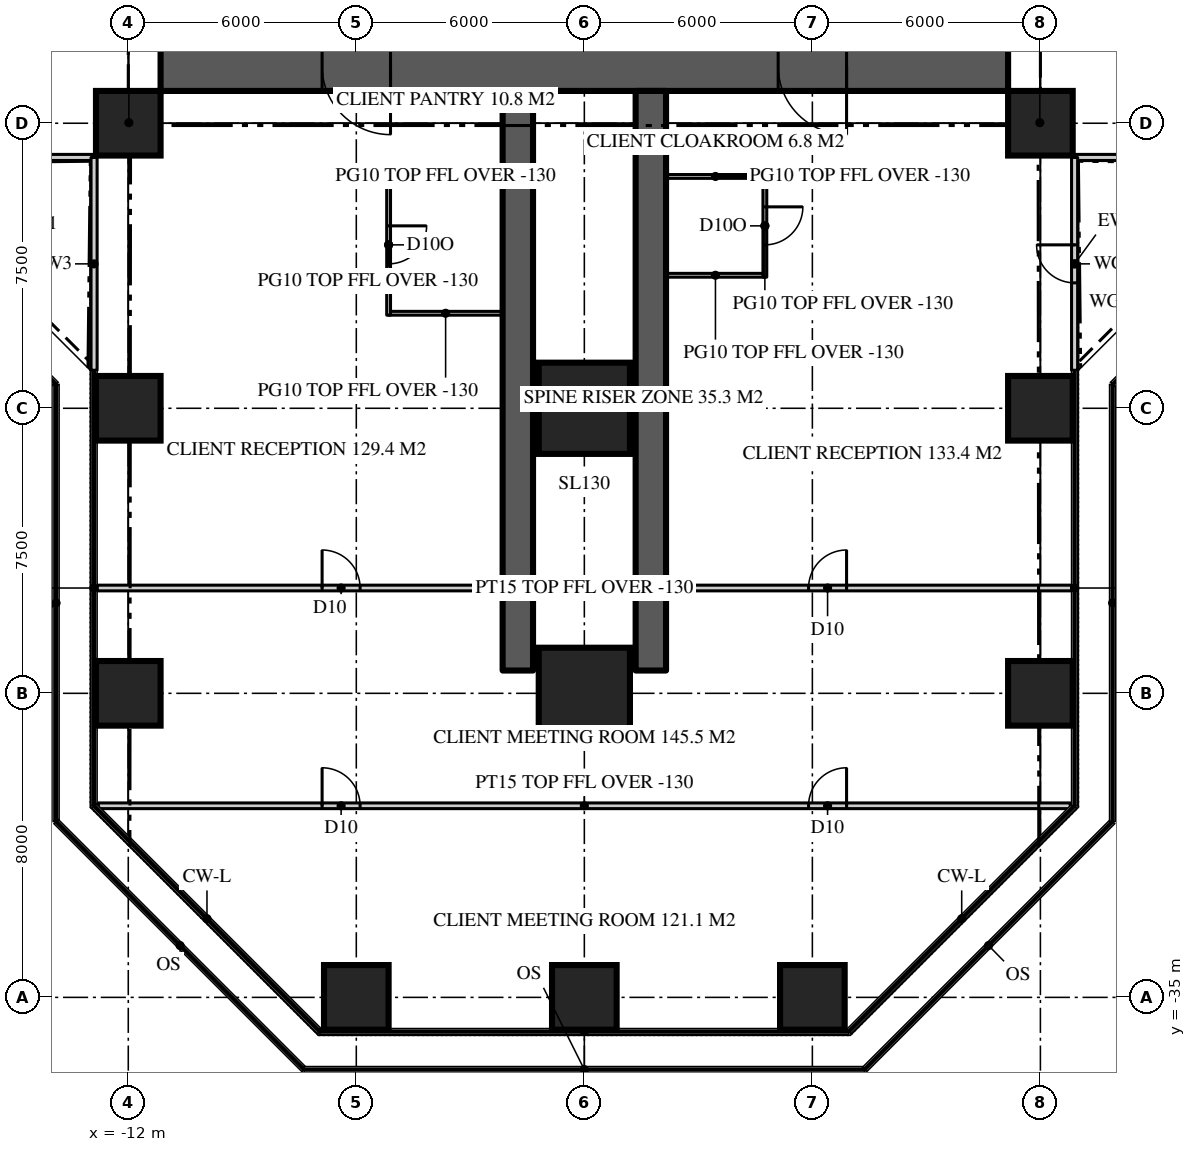
"""IFC4 building model, lengths in metres.
Left out: names, types, materials, properties, quantities, classifications, styles, units other than length and angle.
Written with IfcOpenShell. Run it as: python <this file> out.ifc"""

import sys

from ifc_helpers import new_model, si_unit, direction, frame, frame_2d, origin, origin_2d, place, context, subcontext, project, spatial, rectangle, extrude, element, fill, save


model = new_model("IFC4")
c1 = context("Model", 3, precision=1e-05, world=origin(), true_north=direction((0.0, 1.0)))
c2 = subcontext(c1, "Body", "Model", "MODEL_VIEW")
j1 = project(units=[si_unit("LENGTHUNIT", "METRE"), si_unit("PLANEANGLEUNIT", "RADIAN")], contexts=[c1])
p1 = place(None, origin())
s1 = spatial("IfcSite", under=j1, at=p1, CompositionType="ELEMENT")
p2 = place(p1, origin())
s2 = spatial("IfcBuilding", under=s1, at=p2, CompositionType="ELEMENT")
p3 = place(p2, frame((0.0, 0.0, 98.1)))
s3 = spatial("IfcBuildingStorey", under=s2, at=p3, CompositionType="ELEMENT", Elevation=98.1)
p4 = place(p3, frame((11.15, -10.5, 0.0), z_axis=(0.0, 0.0, 1.0), x_axis=(-1.0, 0.0, 0.0)))
e1 = element("IfcWall", 1, at=p4, inside=s3, PredefinedType="SHEAR", context=c2, shape_type="SweptSolid", body=[
    extrude(rectangle(XDim=22.3, YDim=1.3, at=frame_2d((11.15, 0.0))), origin(), (0.0, 0.0, 1.0), 3.9),
])
p5 = place(p4, frame((16.25, 0.0, 0.0)))
e2 = element("IfcOpeningElement", 2, at=p5, cuts=e1, PredefinedType="OPENING", context=c2, shape_type="SweptSolid", body=[
    extrude(rectangle(XDim=1.8, YDim=2.2, at=frame_2d((0.9, 1.1))), frame((0.0, 0.66, 0.0), z_axis=(0.0, -1.0, 0.0), x_axis=(1.0, 0.0, 0.0)), (0.0, 0.0, 1.0), 1.32),
])
p6 = place(p4, frame((4.25, 0.0, 0.0)))
e3 = element("IfcOpeningElement", 3, at=p6, cuts=e1, PredefinedType="OPENING", context=c2, shape_type="SweptSolid", body=[
    extrude(rectangle(XDim=1.8, YDim=2.2, at=frame_2d((0.9, 1.1))), frame((0.0, 0.66, 0.0), z_axis=(0.0, -1.0, 0.0), x_axis=(1.0, 0.0, 0.0)), (0.0, 0.0, 1.0), 1.32),
])
for number, where, z_axis, x_axis in (
    (4, (-1.75, -11.15, 0.0), (0.0, 0.0, 1.0), (0.0, -1.0, 0.0)),
    (5, (1.75, -11.15, 0.0), (0.0, 0.0, 1.0), (0.0, -1.0, 0.0)),
):
    element("IfcWall", number, at=place(p3, frame(where, z_axis=z_axis, x_axis=x_axis)), inside=s3, PredefinedType="SHEAR", context=c2, shape_type="SweptSolid", body=[
        extrude(rectangle(XDim=15.25, YDim=0.8, at=frame_2d((7.625, 0.0))), origin(), (0.0, 0.0, 1.0), 3.9),
    ])
for number, where, z_axis, x_axis in (
    (6, (-6.0, -35.0, 0.0), (0.0, 0.0, 1.0), (1.0, 0.0, 0.0)),
    (7, (0.0, -35.0, 0.0), (0.0, 0.0, 1.0), (1.0, 0.0, 0.0)),
    (8, (6.0, -35.0, 0.0), (0.0, 0.0, 1.0), (1.0, 0.0, 0.0)),
    (9, (-12.0, -27.0, 0.0), (0.0, 0.0, 1.0), (1.0, 0.0, 0.0)),
):
    element("IfcColumn", number, at=place(p3, frame(where, z_axis=z_axis, x_axis=x_axis)), inside=s3, PredefinedType="COLUMN", context=c2, shape_type="SweptSolid", body=[
        extrude(rectangle(XDim=1.7, YDim=1.7, at=origin_2d()), origin(), (0.0, 0.0, 1.0), 3.9),
    ])
p7 = place(p3, frame((0.0, -27.0, 0.0), z_axis=(0.0, 0.0, 1.0), x_axis=(1.0, 0.0, 0.0)))
e10 = element("IfcColumn", 10, at=p7, inside=s3, PredefinedType="COLUMN", context=c2, shape_type="SweptSolid", body=[
    extrude(rectangle(XDim=2.4, YDim=2.4, at=origin_2d()), origin(), (0.0, 0.0, 1.0), 3.9),
])
for number, where, z_axis, x_axis in (
    (11, (12.0, -27.0, 0.0), (0.0, 0.0, 1.0), (1.0, 0.0, 0.0)),
    (12, (-12.0, -19.5, 0.0), (0.0, 0.0, 1.0), (1.0, 0.0, 0.0)),
):
    element("IfcColumn", number, at=place(p3, frame(where, z_axis=z_axis, x_axis=x_axis)), inside=s3, PredefinedType="COLUMN", context=c2, shape_type="SweptSolid", body=[
        extrude(rectangle(XDim=1.7, YDim=1.7, at=origin_2d()), origin(), (0.0, 0.0, 1.0), 3.9),
    ])
p8 = place(p3, frame((0.0, -19.5, 0.0), z_axis=(0.0, 0.0, 1.0), x_axis=(1.0, 0.0, 0.0)))
e13 = element("IfcColumn", 13, at=p8, inside=s3, PredefinedType="COLUMN", context=c2, shape_type="SweptSolid", body=[
    extrude(rectangle(XDim=2.4, YDim=2.4, at=origin_2d()), origin(), (0.0, 0.0, 1.0), 3.9),
])
for number, where, z_axis, x_axis in (
    (14, (12.0, -19.5, 0.0), (0.0, 0.0, 1.0), (1.0, 0.0, 0.0)),
    (15, (-12.0, -12.0, 0.0), (0.0, 0.0, 1.0), (1.0, 0.0, 0.0)),
    (16, (12.0, -12.0, 0.0), (0.0, 0.0, 1.0), (1.0, 0.0, 0.0)),
):
    element("IfcColumn", number, at=place(p3, frame(where, z_axis=z_axis, x_axis=x_axis)), inside=s3, PredefinedType="COLUMN", context=c2, shape_type="SweptSolid", body=[
        extrude(rectangle(XDim=1.7, YDim=1.7, at=origin_2d()), origin(), (0.0, 0.0, 1.0), 3.9),
    ])
p9 = place(p3, frame((12.9, -12.9, 0.0), z_axis=(0.0, 0.0, 1.0), x_axis=(1.0, 0.0, 0.0)))
e17 = element("IfcWall", 17, at=p9, inside=s3, PredefinedType="SOLIDWALL", context=c2, shape_type="SweptSolid", body=[
    extrude(rectangle(XDim=5.6, YDim=0.16, at=frame_2d((2.8, 0.0))), origin(), (0.0, 0.0, 1.0), 3.77),
])
p10 = place(p3, frame((-18.5, -12.9, 0.0), z_axis=(0.0, 0.0, 1.0), x_axis=(1.0, 0.0, 0.0)))
e18 = element("IfcWall", 18, at=p10, inside=s3, PredefinedType="SOLIDWALL", context=c2, shape_type="SweptSolid", body=[
    extrude(rectangle(XDim=5.6, YDim=0.16, at=frame_2d((2.8, 0.0))), origin(), (0.0, 0.0, 1.0), 3.77),
])
p11 = place(p10, frame((2.3, 0.0, 0.0)))
e19 = element("IfcOpeningElement", 19, at=p11, cuts=e18, PredefinedType="OPENING", context=c2, shape_type="SweptSolid", body=[
    extrude(rectangle(XDim=1.0, YDim=2.2, at=frame_2d((0.5, 1.1))), frame((0.0, 0.09, 0.0), z_axis=(0.0, -1.0, 0.0), x_axis=(1.0, 0.0, 0.0)), (0.0, 0.0, 1.0), 0.18),
])
p12 = place(p3, frame((-12.9, -12.9, 0.0), z_axis=(0.0, 0.0, 1.0), x_axis=(0.0, -1.0, 0.0)))
e20 = element("IfcWall", 20, at=p12, inside=s3, PredefinedType="SOLIDWALL", context=c2, shape_type="SweptSolid", body=[
    extrude(rectangle(XDim=5.6, YDim=0.16, at=frame_2d((2.8, 0.0))), origin(), (0.0, 0.0, 1.0), 3.77),
])
p13 = place(p3, frame((12.9, -18.5, 0.0), z_axis=(0.0, 0.0, 1.0), x_axis=(0.0, 1.0, 0.0)))
e21 = element("IfcWall", 21, at=p13, inside=s3, PredefinedType="SOLIDWALL", context=c2, shape_type="SweptSolid", body=[
    extrude(rectangle(XDim=5.6, YDim=0.16, at=frame_2d((2.8, 0.0))), origin(), (0.0, 0.0, 1.0), 3.77),
])
p14 = place(p13, frame((2.3, 0.0, 0.0)))
e22 = element("IfcOpeningElement", 22, at=p14, cuts=e21, PredefinedType="OPENING", context=c2, shape_type="SweptSolid", body=[
    extrude(rectangle(XDim=1.0, YDim=2.2, at=frame_2d((0.5, 1.1))), frame((0.0, 0.09, 0.0), z_axis=(0.0, -1.0, 0.0), x_axis=(1.0, 0.0, 0.0)), (0.0, 0.0, 1.0), 0.18),
])
p15 = place(p3, frame((-12.82, -24.229, 0.0), z_axis=(0.0, 0.0, 1.0), x_axis=(1.0, 0.0, 0.0)))
e23 = element("IfcWall", 23, at=p15, inside=s3, PredefinedType="PARTITIONING", context=c2, shape_type="SweptSolid", body=[
    extrude(rectangle(XDim=25.64, YDim=0.15, at=frame_2d((12.82, 0.0))), origin(), (0.0, 0.0, 1.0), 3.77),
])
p16 = place(p15, frame((18.72, 0.0, 0.0)))
e24 = element("IfcOpeningElement", 24, at=p16, cuts=e23, PredefinedType="OPENING", context=c2, shape_type="SweptSolid", body=[
    extrude(rectangle(XDim=1.0, YDim=2.2, at=frame_2d((0.5, 1.1))), frame((0.0, 0.085, 0.0), z_axis=(0.0, -1.0, 0.0), x_axis=(1.0, 0.0, 0.0)), (0.0, 0.0, 1.0), 0.17),
])
p17 = place(p15, frame((5.92, 0.0, 0.0)))
e25 = element("IfcOpeningElement", 25, at=p17, cuts=e23, PredefinedType="OPENING", context=c2, shape_type="SweptSolid", body=[
    extrude(rectangle(XDim=1.0, YDim=2.2, at=frame_2d((0.5, 1.1))), frame((0.0, 0.085, 0.0), z_axis=(0.0, -1.0, 0.0), x_axis=(1.0, 0.0, 0.0)), (0.0, 0.0, 1.0), 0.17),
])
p18 = place(p3, frame((-12.786, -29.959, 0.0), z_axis=(0.0, 0.0, 1.0), x_axis=(1.0, 0.0, 0.0)))
e26 = element("IfcWall", 26, at=p18, inside=s3, PredefinedType="PARTITIONING", context=c2, shape_type="SweptSolid", body=[
    extrude(rectangle(XDim=25.573, YDim=0.15, at=frame_2d((12.786, 0.0))), origin(), (0.0, 0.0, 1.0), 3.77),
])
p19 = place(p18, frame((18.687, 0.0, 0.0)))
e27 = element("IfcOpeningElement", 27, at=p19, cuts=e26, PredefinedType="OPENING", context=c2, shape_type="SweptSolid", body=[
    extrude(rectangle(XDim=1.0, YDim=2.2, at=frame_2d((0.5, 1.1))), frame((0.0, 0.085, 0.0), z_axis=(0.0, -1.0, 0.0), x_axis=(1.0, 0.0, 0.0)), (0.0, 0.0, 1.0), 0.17),
])
p20 = place(p18, frame((5.886, 0.0, 0.0)))
e28 = element("IfcOpeningElement", 28, at=p20, cuts=e26, PredefinedType="OPENING", context=c2, shape_type="SweptSolid", body=[
    extrude(rectangle(XDim=1.0, YDim=2.2, at=frame_2d((0.5, 1.1))), frame((0.0, 0.085, 0.0), z_axis=(0.0, -1.0, 0.0), x_axis=(1.0, 0.0, 0.0)), (0.0, 0.0, 1.0), 0.17),
])
for number, where, z_axis, x_axis in (
    (29, (2.15, -13.4, 0.0), (0.0, 0.0, 1.0), (1.0, 0.0, 0.0)),
    (30, (2.15, -16.0, 0.0), (0.0, 0.0, 1.0), (1.0, 0.0, 0.0)),
):
    element("IfcWall", number, at=place(p3, frame(where, z_axis=z_axis, x_axis=x_axis)), inside=s3, PredefinedType="PARTITIONING", context=c2, shape_type="SweptSolid", body=[
        extrude(rectangle(XDim=2.6, YDim=0.1, at=frame_2d((1.3, 0.0))), origin(), (0.0, 0.0, 1.0), 3.77),
    ])
p21 = place(p3, frame((4.75, -13.35, 0.0), z_axis=(0.0, 0.0, 1.0), x_axis=(0.0, -1.0, 0.0)))
e31 = element("IfcWall", 31, at=p21, inside=s3, PredefinedType="PARTITIONING", context=c2, shape_type="SweptSolid", body=[
    extrude(rectangle(XDim=2.7, YDim=0.1, at=frame_2d((1.35, 0.0))), origin(), (0.0, 0.0, 1.0), 3.77),
])
p22 = place(p21, frame((0.85, 0.0, 0.0)))
e32 = element("IfcOpeningElement", 32, at=p22, cuts=e31, PredefinedType="OPENING", context=c2, shape_type="SweptSolid", body=[
    extrude(rectangle(XDim=1.0, YDim=2.2, at=frame_2d((0.5, 1.1))), frame((0.0, 0.06, 0.0), z_axis=(0.0, -1.0, 0.0), x_axis=(1.0, 0.0, 0.0)), (0.0, 0.0, 1.0), 0.12),
])
for number, where, z_axis, x_axis in (
    (33, (-2.15, -13.4, 0.0), (0.0, 0.0, 1.0), (-1.0, 0.0, 0.0)),
    (34, (-2.15, -17.0, 0.0), (0.0, 0.0, 1.0), (-1.0, 0.0, 0.0)),
):
    element("IfcWall", number, at=place(p3, frame(where, z_axis=z_axis, x_axis=x_axis)), inside=s3, PredefinedType="PARTITIONING", context=c2, shape_type="SweptSolid", body=[
        extrude(rectangle(XDim=3.0, YDim=0.1, at=frame_2d((1.5, 0.0))), origin(), (0.0, 0.0, 1.0), 3.77),
    ])
p23 = place(p3, frame((-5.15, -13.35, 0.0), z_axis=(0.0, 0.0, 1.0), x_axis=(0.0, -1.0, 0.0)))
e35 = element("IfcWall", 35, at=p23, inside=s3, PredefinedType="PARTITIONING", context=c2, shape_type="SweptSolid", body=[
    extrude(rectangle(XDim=3.7, YDim=0.1, at=frame_2d((1.85, 0.0))), origin(), (0.0, 0.0, 1.0), 3.77),
])
p24 = place(p23, frame((1.35, 0.0, 0.0)))
e36 = element("IfcOpeningElement", 36, at=p24, cuts=e35, PredefinedType="OPENING", context=c2, shape_type="SweptSolid", body=[
    extrude(rectangle(XDim=1.0, YDim=2.2, at=frame_2d((0.5, 1.1))), frame((0.0, 0.06, 0.0), z_axis=(0.0, -1.0, 0.0), x_axis=(1.0, 0.0, 0.0)), (0.0, 0.0, 1.0), 0.12),
])
for number, where, z_axis, x_axis in (
    (37, (-11.15, -11.15, 0.0), (0.0, 0.0, 1.0), (-0.707, -0.707, 0.0)),
    (38, (11.15, -11.15, 0.0), (0.0, 0.0, 1.0), (0.707, -0.707, 0.0)),
):
    element("IfcWall", number, at=place(p3, frame(where, z_axis=z_axis, x_axis=x_axis)), inside=s3, PredefinedType="PARTITIONING", context=c2, shape_type="SweptSolid", body=[
        extrude(rectangle(XDim=2.362, YDim=0.15, at=frame_2d((1.181, 0.0))), origin(), (0.0, 0.0, 1.0), 3.22),
    ])
p25 = place(p14, origin())
e39 = element("IfcDoor", 39, at=p25, inside=s3, OperationType="SINGLE_SWING_RIGHT", PredefinedType="DOOR", context=c2, shape_type="SweptSolid", body=[
    extrude(rectangle(XDim=1.0, YDim=2.2, at=frame_2d((0.5, 1.1))), frame((0.0, 0.025, 0.0), z_axis=(0.0, -1.0, 0.0), x_axis=(1.0, 0.0, 0.0)), (0.0, 0.0, 1.0), 0.05),
])
fill(e22, e39)
p26 = place(p5, origin())
e40 = element("IfcDoor", 40, at=p26, inside=s3, OperationType="DOUBLE_DOOR_DOUBLE_SWING", PredefinedType="DOOR", context=c2, shape_type="SweptSolid", body=[
    extrude(rectangle(XDim=1.8, YDim=2.2, at=frame_2d((0.9, 1.1))), frame((0.0, 0.025, 0.0), z_axis=(0.0, -1.0, 0.0), x_axis=(1.0, 0.0, 0.0)), (0.0, 0.0, 1.0), 0.05),
])
fill(e2, e40)
p27 = place(p6, origin())
e41 = element("IfcDoor", 41, at=p27, inside=s3, OperationType="DOUBLE_DOOR_DOUBLE_SWING", PredefinedType="DOOR", context=c2, shape_type="SweptSolid", body=[
    extrude(rectangle(XDim=1.8, YDim=2.2, at=frame_2d((0.9, 1.1))), frame((0.0, 0.025, 0.0), z_axis=(0.0, -1.0, 0.0), x_axis=(1.0, 0.0, 0.0)), (0.0, 0.0, 1.0), 0.05),
])
fill(e3, e41)
p28 = place(p16, origin())
e42 = element("IfcDoor", 42, at=p28, inside=s3, OperationType="SINGLE_SWING_RIGHT", PredefinedType="DOOR", context=c2, shape_type="SweptSolid", body=[
    extrude(rectangle(XDim=1.0, YDim=2.2, at=frame_2d((0.5, 1.1))), frame((0.0, 0.025, 0.0), z_axis=(0.0, -1.0, 0.0), x_axis=(1.0, 0.0, 0.0)), (0.0, 0.0, 1.0), 0.05),
])
fill(e24, e42)
p29 = place(p17, origin())
e43 = element("IfcDoor", 43, at=p29, inside=s3, OperationType="SINGLE_SWING_LEFT", PredefinedType="DOOR", context=c2, shape_type="SweptSolid", body=[
    extrude(rectangle(XDim=1.0, YDim=2.2, at=frame_2d((0.5, 1.1))), frame((0.0, 0.025, 0.0), z_axis=(0.0, -1.0, 0.0), x_axis=(1.0, 0.0, 0.0)), (0.0, 0.0, 1.0), 0.05),
])
fill(e25, e43)
p30 = place(p19, origin())
e44 = element("IfcDoor", 44, at=p30, inside=s3, OperationType="SINGLE_SWING_RIGHT", PredefinedType="DOOR", context=c2, shape_type="SweptSolid", body=[
    extrude(rectangle(XDim=1.0, YDim=2.2, at=frame_2d((0.5, 1.1))), frame((0.0, 0.025, 0.0), z_axis=(0.0, -1.0, 0.0), x_axis=(1.0, 0.0, 0.0)), (0.0, 0.0, 1.0), 0.05),
])
fill(e27, e44)
p31 = place(p20, origin())
e45 = element("IfcDoor", 45, at=p31, inside=s3, OperationType="SINGLE_SWING_LEFT", PredefinedType="DOOR", context=c2, shape_type="SweptSolid", body=[
    extrude(rectangle(XDim=1.0, YDim=2.2, at=frame_2d((0.5, 1.1))), frame((0.0, 0.025, 0.0), z_axis=(0.0, -1.0, 0.0), x_axis=(1.0, 0.0, 0.0)), (0.0, 0.0, 1.0), 0.05),
])
fill(e28, e45)
p32 = place(p22, origin())
e46 = element("IfcDoor", 46, at=p32, inside=s3, OperationType="SINGLE_SWING_LEFT", PredefinedType="DOOR", context=c2, shape_type="SweptSolid", body=[
    extrude(rectangle(XDim=1.0, YDim=2.2, at=frame_2d((0.5, 1.1))), frame((0.0, 0.025, 0.0), z_axis=(0.0, -1.0, 0.0), x_axis=(1.0, 0.0, 0.0)), (0.0, 0.0, 1.0), 0.05),
])
fill(e32, e46)
p33 = place(p24, origin())
e47 = element("IfcDoor", 47, at=p33, inside=s3, OperationType="SINGLE_SWING_LEFT", PredefinedType="DOOR", context=c2, shape_type="SweptSolid", body=[
    extrude(rectangle(XDim=1.0, YDim=2.2, at=frame_2d((0.5, 1.1))), frame((0.0, 0.025, 0.0), z_axis=(0.0, -1.0, 0.0), x_axis=(1.0, 0.0, 0.0)), (0.0, 0.0, 1.0), 0.05),
])
fill(e36, e47)
save(model, sys.argv[1])
